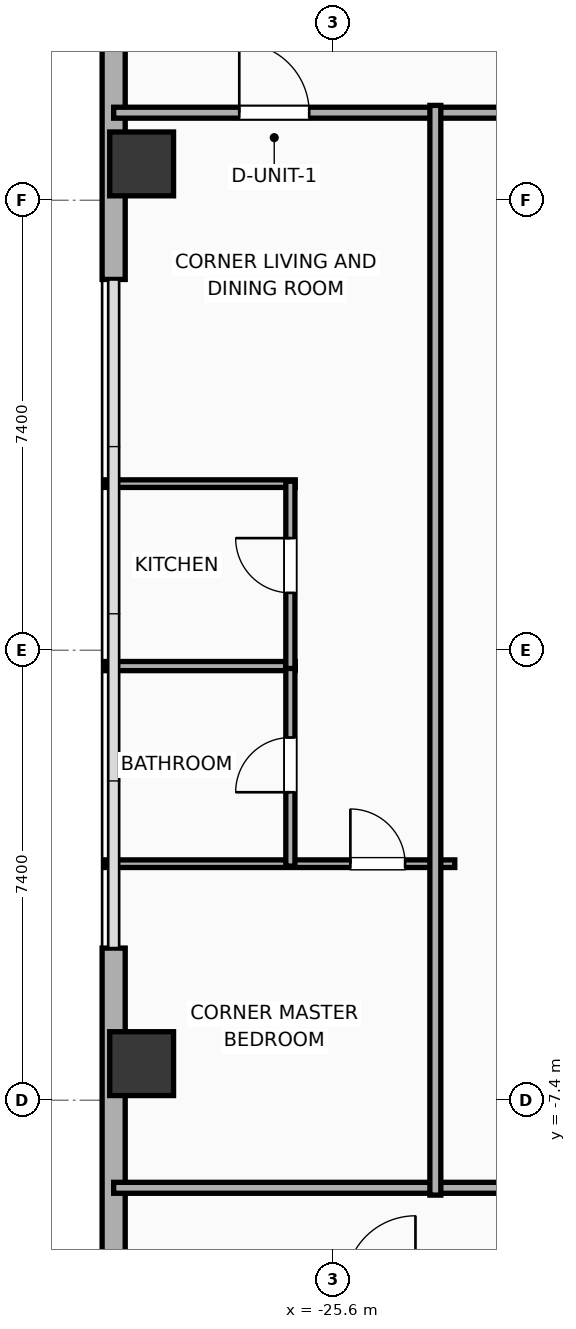
"""IFC4 building model, lengths in metres.
Left out: names, types, materials, properties, quantities, classifications, styles, units other than length and angle.
Written with IfcOpenShell. Run it as: python <this file> out.ifc"""

import sys

from ifc_helpers import new_model, si_unit, direction, frame, frame_2d, origin, origin_2d, place, context, subcontext, project, spatial, rectangle, hollow_rectangle, extrude, element, fill, save


model = new_model("IFC4")
c1 = context("Model", 3, precision=1e-05, world=origin(), true_north=direction((0.0, 1.0)))
c2 = subcontext(c1, "Body", "Model", "MODEL_VIEW")
j1 = project(units=[si_unit("LENGTHUNIT", "METRE"), si_unit("PLANEANGLEUNIT", "RADIAN")], contexts=[c1])
p1 = place(None, origin())
s1 = spatial("IfcSite", under=j1, at=p1, CompositionType="ELEMENT")
p2 = place(p1, origin())
s2 = spatial("IfcBuilding", under=s1, at=p2, CompositionType="ELEMENT")
p3 = place(p2, frame((0.0, 0.0, 117.0)))
s3 = spatial("IfcBuildingStorey", under=s2, at=p3, CompositionType="ELEMENT", Elevation=117.0)
for number, where, z_axis, x_axis in (
    (1, (-28.75, 7.998, 0.0), (0.0, 0.0, 1.0), (1.0, 0.0, 0.0)),
    (2, (-28.75, -6.798, 0.0), (0.0, 0.0, 1.0), (1.0, 0.0, 0.0)),
):
    element("IfcColumn", number, at=place(p3, frame(where, z_axis=z_axis, x_axis=x_axis)), inside=s3, PredefinedType="COLUMN", context=c2, shape_type="SweptSolid", body=[
        extrude(hollow_rectangle(XDim=1.05, YDim=1.05, WallThickness=0.036, at=origin_2d()), origin(), (0.0, 0.0, 1.0), 3.9),
    ])
p4 = place(p3, frame((-29.21, -16.581, 0.0), z_axis=(0.0, 0.0, 1.0), x_axis=(0.0, 1.0, 0.0)))
e3 = element("IfcWall", 3, at=p4, inside=s3, PredefinedType="ELEMENTEDWALL", context=c2, shape_type="SweptSolid", body=[
    extrude(rectangle(XDim=11.683, YDim=0.38, at=frame_2d((5.842, 0.0))), origin(), (0.0, 0.0, 1.0), 3.65),
])
p5 = place(p3, frame((-29.21, 6.098, 0.0), z_axis=(0.0, 0.0, 1.0), x_axis=(0.0, 1.0, 0.0)))
e4 = element("IfcWall", 4, at=p5, inside=s3, PredefinedType="ELEMENTEDWALL", context=c2, shape_type="SweptSolid", body=[
    extrude(rectangle(XDim=11.683, YDim=0.38, at=frame_2d((5.842, 0.0))), origin(), (0.0, 0.0, 1.0), 3.65),
])
p6 = place(p5, frame((4.942, 0.0, 0.75)))
e5 = element("IfcOpeningElement", 5, at=p6, cuts=e4, PredefinedType="OPENING", context=c2, shape_type="SweptSolid", body=[
    extrude(rectangle(XDim=1.8, YDim=2.1, at=frame_2d((0.9, 1.05))), frame((0.0, 0.2, 0.0), z_axis=(0.0, -1.0, 0.0), x_axis=(1.0, 0.0, 0.0)), (0.0, 0.0, 1.0), 0.4),
])
p7 = place(p5, frame((8.583, 0.0, 0.75)))
e6 = element("IfcOpeningElement", 6, at=p7, cuts=e4, PredefinedType="OPENING", context=c2, shape_type="SweptSolid", body=[
    extrude(rectangle(XDim=1.2, YDim=2.05, at=frame_2d((0.6, 1.025))), frame((0.0, 0.2, 0.0), z_axis=(0.0, -1.0, 0.0), x_axis=(1.0, 0.0, 0.0)), (0.0, 0.0, 1.0), 0.4),
])
p8 = place(p3, frame((-29.21, 8.84, 0.0), z_axis=(0.0, 0.0, 1.0), x_axis=(1.0, 0.0, 0.0)))
e7 = element("IfcWall", 7, at=p8, inside=s3, PredefinedType="PARTITIONING", context=c2, shape_type="SweptSolid", body=[
    extrude(rectangle(XDim=19.33, YDim=0.18, at=frame_2d((9.665, 0.0))), origin(), (0.0, 0.0, 1.0), 3.65),
])
p9 = place(p8, frame((2.065, 0.0, 0.0)))
e8 = element("IfcOpeningElement", 8, at=p9, cuts=e7, PredefinedType="OPENING", context=c2, shape_type="SweptSolid", body=[
    extrude(rectangle(XDim=1.15, YDim=2.05, at=frame_2d((0.575, 1.025))), frame((0.0, 0.1, 0.0), z_axis=(0.0, -1.0, 0.0), x_axis=(1.0, 0.0, 0.0)), (0.0, 0.0, 1.0), 0.2),
])
p10 = place(p3, frame((-29.21, -8.84, 0.0), z_axis=(0.0, 0.0, 1.0), x_axis=(1.0, 0.0, 0.0)))
e9 = element("IfcWall", 9, at=p10, inside=s3, PredefinedType="PARTITIONING", context=c2, shape_type="SweptSolid", body=[
    extrude(rectangle(XDim=19.33, YDim=0.18, at=frame_2d((9.665, 0.0))), origin(), (0.0, 0.0, 1.0), 3.65),
])
p11 = place(p3, frame((-29.36, 2.74, 0.0), z_axis=(0.0, 0.0, 1.0), x_axis=(1.0, 0.0, 0.0)))
e10 = element("IfcWall", 10, at=p11, inside=s3, PredefinedType="PARTITIONING", context=c2, shape_type="SweptSolid", body=[
    extrude(rectangle(XDim=3.136, YDim=0.125, at=frame_2d((1.568, 0.0))), origin(), (0.0, 0.0, 1.0), 3.65),
])
p12 = place(p3, frame((-29.36, -0.26, 0.0), z_axis=(0.0, 0.0, 1.0), x_axis=(1.0, 0.0, 0.0)))
e11 = element("IfcWall", 11, at=p12, inside=s3, PredefinedType="PLUMBINGWALL", context=c2, shape_type="SweptSolid", body=[
    extrude(rectangle(XDim=3.136, YDim=0.15, at=frame_2d((1.568, 0.0))), origin(), (0.0, 0.0, 1.0), 3.65),
])
p13 = place(p3, frame((-29.36, -3.51, 0.0), z_axis=(0.0, 0.0, 1.0), x_axis=(1.0, 0.0, 0.0)))
e12 = element("IfcWall", 12, at=p13, inside=s3, PredefinedType="PARTITIONING", context=c2, shape_type="SweptSolid", body=[
    extrude(rectangle(XDim=5.76, YDim=0.125, at=frame_2d((2.88, 0.0))), origin(), (0.0, 0.0, 1.0), 3.65),
])
p14 = place(p13, frame((4.043, 0.0, 0.0)))
e13 = element("IfcOpeningElement", 13, at=p14, cuts=e12, PredefinedType="OPENING", context=c2, shape_type="SweptSolid", body=[
    extrude(rectangle(XDim=0.9, YDim=2.05, at=frame_2d((0.45, 1.025))), frame((0.0, 0.073, 0.0), z_axis=(0.0, -1.0, 0.0), x_axis=(1.0, 0.0, 0.0)), (0.0, 0.0, 1.0), 0.145),
])
p15 = place(p3, frame((-26.304, -3.55, 0.0), z_axis=(0.0, 0.0, 1.0), x_axis=(0.0, 1.0, 0.0)))
e14 = element("IfcWall", 14, at=p15, inside=s3, PredefinedType="PLUMBINGWALL", context=c2, shape_type="SweptSolid", body=[
    extrude(rectangle(XDim=3.33, YDim=0.15, at=frame_2d((1.665, 0.0))), origin(), (0.0, 0.0, 1.0), 3.65),
])
p16 = place(p15, frame((1.215, 0.0, 0.0)))
e15 = element("IfcOpeningElement", 15, at=p16, cuts=e14, PredefinedType="OPENING", context=c2, shape_type="SweptSolid", body=[
    extrude(rectangle(XDim=0.9, YDim=2.05, at=frame_2d((0.45, 1.025))), frame((0.0, 0.085, 0.0), z_axis=(0.0, -1.0, 0.0), x_axis=(1.0, 0.0, 0.0)), (0.0, 0.0, 1.0), 0.17),
])
p17 = place(p3, frame((-26.304, -0.3, 0.0), z_axis=(0.0, 0.0, 1.0), x_axis=(0.0, 1.0, 0.0)))
e16 = element("IfcWall", 16, at=p17, inside=s3, PredefinedType="PLUMBINGWALL", context=c2, shape_type="SweptSolid", body=[
    extrude(rectangle(XDim=3.08, YDim=0.15, at=frame_2d((1.54, 0.0))), origin(), (0.0, 0.0, 1.0), 3.65),
])
p18 = place(p17, frame((1.244, 0.0, 0.0)))
e17 = element("IfcOpeningElement", 17, at=p18, cuts=e16, PredefinedType="OPENING", context=c2, shape_type="SweptSolid", body=[
    extrude(rectangle(XDim=0.9, YDim=2.05, at=frame_2d((0.45, 1.025))), frame((0.0, 0.085, 0.0), z_axis=(0.0, -1.0, 0.0), x_axis=(1.0, 0.0, 0.0)), (0.0, 0.0, 1.0), 0.17),
])
p19 = place(p3, frame((-23.92, -8.96, 0.0), z_axis=(0.0, 0.0, 1.0), x_axis=(0.0, 1.0, 0.0)))
e18 = element("IfcWall", 18, at=p19, inside=s3, PredefinedType="PARTITIONING", context=c2, shape_type="SweptSolid", body=[
    extrude(rectangle(XDim=17.92, YDim=0.18, at=frame_2d((8.96, 0.0))), origin(), (0.0, 0.0, 1.0), 3.65),
])
p20 = place(p9, origin())
e19 = element("IfcDoor", 19, at=p20, inside=s3, OperationType="SINGLE_SWING_LEFT", PredefinedType="DOOR", context=c2, shape_type="SweptSolid", body=[
    extrude(rectangle(XDim=1.15, YDim=2.05, at=frame_2d((0.575, 1.025))), frame((0.0, 0.025, 0.0), z_axis=(0.0, -1.0, 0.0), x_axis=(1.0, 0.0, 0.0)), (0.0, 0.0, 1.0), 0.05),
])
fill(e8, e19)
p21 = place(p14, origin())
e20 = element("IfcDoor", 20, at=p21, inside=s3, OperationType="SINGLE_SWING_LEFT", PredefinedType="DOOR", context=c2, shape_type="SweptSolid", body=[
    extrude(rectangle(XDim=0.9, YDim=2.05, at=frame_2d((0.45, 1.025))), frame((0.0, 0.025, 0.0), z_axis=(0.0, -1.0, 0.0), x_axis=(1.0, 0.0, 0.0)), (0.0, 0.0, 1.0), 0.05),
])
fill(e13, e20)
p22 = place(p16, origin())
e21 = element("IfcDoor", 21, at=p22, inside=s3, OperationType="SINGLE_SWING_LEFT", PredefinedType="DOOR", context=c2, shape_type="SweptSolid", body=[
    extrude(rectangle(XDim=0.9, YDim=2.05, at=frame_2d((0.45, 1.025))), frame((0.0, 0.025, 0.0), z_axis=(0.0, -1.0, 0.0), x_axis=(1.0, 0.0, 0.0)), (0.0, 0.0, 1.0), 0.05),
])
fill(e15, e21)
p23 = place(p18, origin())
e22 = element("IfcDoor", 22, at=p23, inside=s3, OperationType="SINGLE_SWING_RIGHT", PredefinedType="DOOR", context=c2, shape_type="SweptSolid", body=[
    extrude(rectangle(XDim=0.9, YDim=2.05, at=frame_2d((0.45, 1.025))), frame((0.0, 0.025, 0.0), z_axis=(0.0, -1.0, 0.0), x_axis=(1.0, 0.0, 0.0)), (0.0, 0.0, 1.0), 0.05),
])
fill(e17, e22)
save(model, sys.argv[1])
